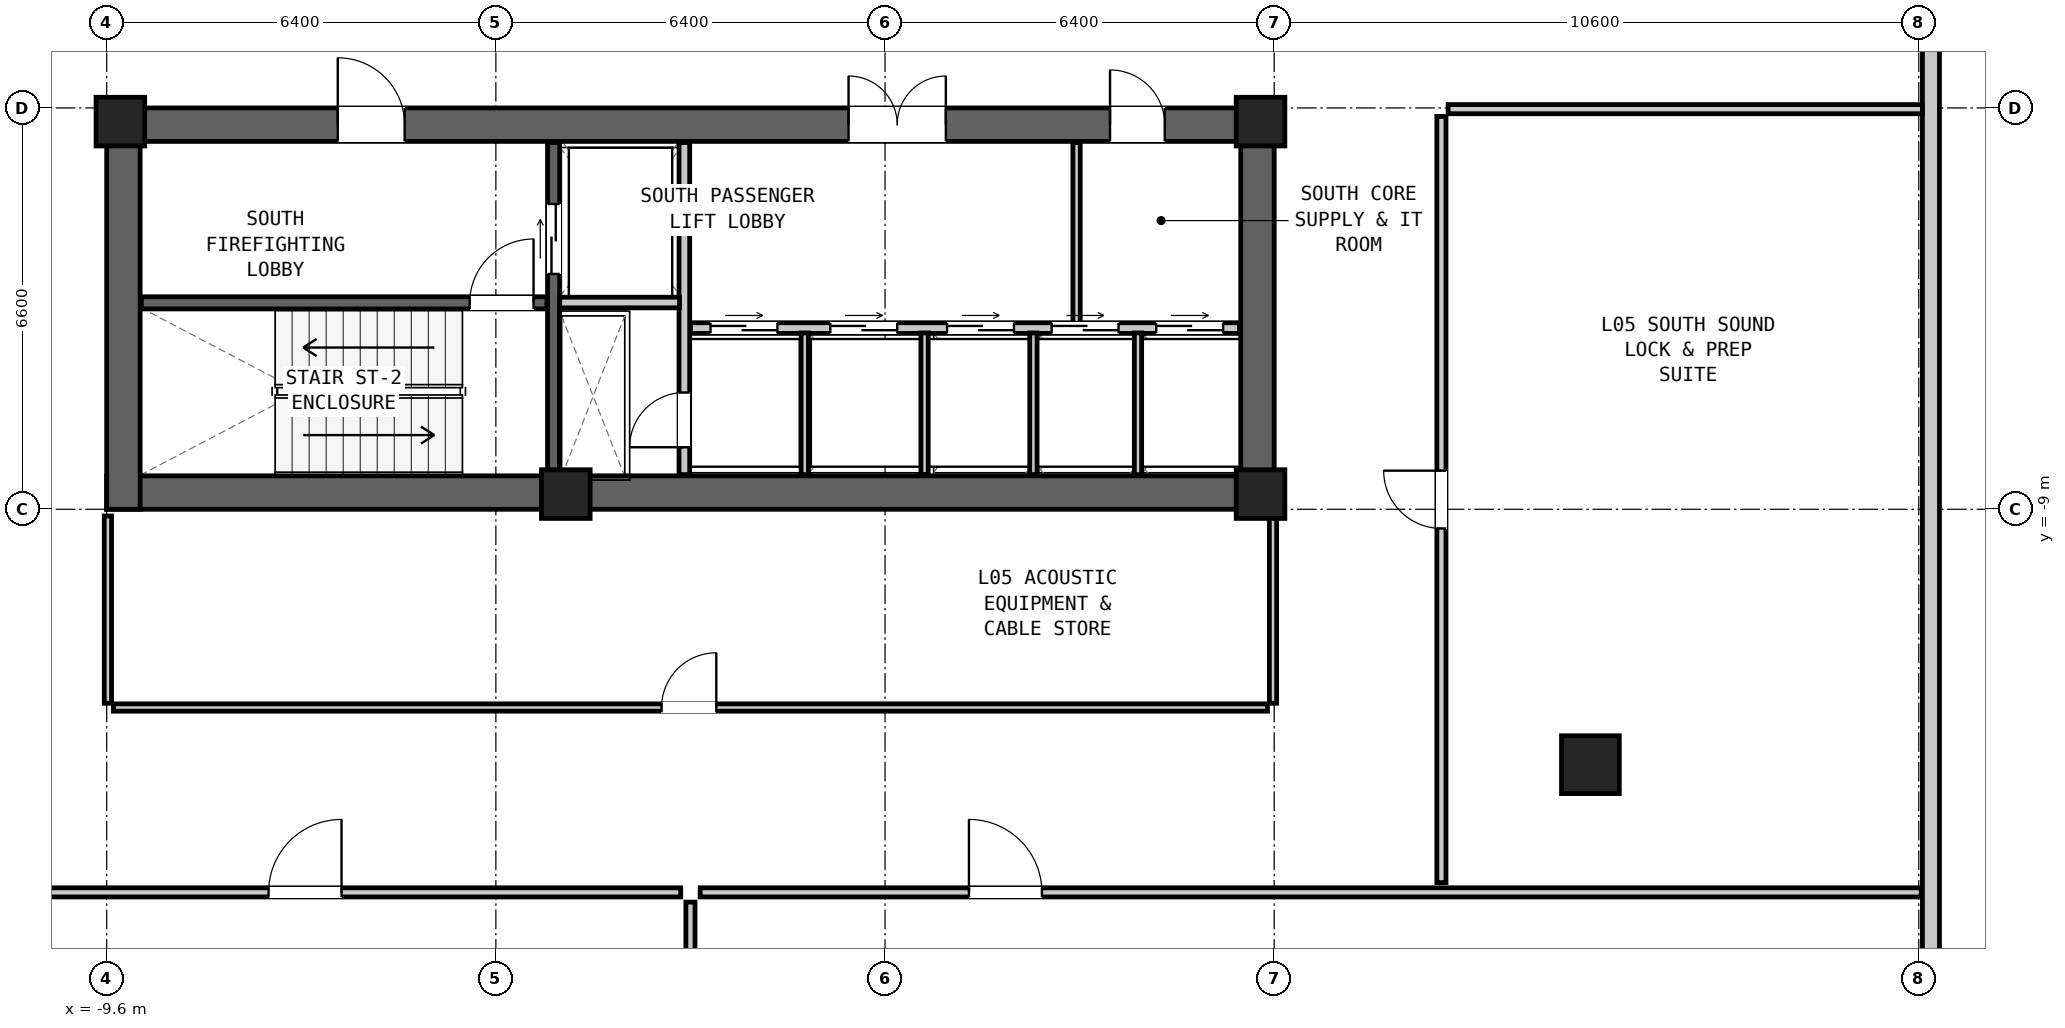
"""IFC4 building model, lengths in metres.
Left out: names, types, materials, properties, quantities, classifications, styles, units other than length and angle.
Written with IfcOpenShell. Run it as: python <this file> out.ifc"""

import sys

from ifc_helpers import new_model, si_unit, direction, frame, frame_2d, origin, origin_2d, place, context, subcontext, project, spatial, rectangle, hollow_rectangle, extrude, element, fill, save


model = new_model("IFC4")
c1 = context("Model", 3, precision=1e-05, world=origin(), true_north=direction((0.0, 1.0)))
c2 = subcontext(c1, "Body", "Model", "MODEL_VIEW")
j1 = project(units=[si_unit("LENGTHUNIT", "METRE"), si_unit("PLANEANGLEUNIT", "RADIAN")], contexts=[c1])
p1 = place(None, origin())
s1 = spatial("IfcSite", under=j1, at=p1, CompositionType="ELEMENT")
p2 = place(p1, origin())
s2 = spatial("IfcBuilding", under=s1, at=p2, CompositionType="ELEMENT")
p3 = place(p2, frame((0.0, 0.0, 21.9)))
s3 = spatial("IfcBuildingStorey", under=s2, at=p3, CompositionType="ELEMENT", Elevation=21.9)
p4 = place(p3, frame((-9.6, -8.725, 0.0), z_axis=(0.0, 0.0, 1.0), x_axis=(1.0, 0.0, 0.0)))
e1 = element("IfcWall", 1, at=p4, inside=s3, PredefinedType="SHEAR", context=c2, shape_type="SweptSolid", body=[
    extrude(rectangle(XDim=19.2, YDim=0.55, at=frame_2d((9.6, 0.0))), origin(), (0.0, 0.0, 1.0), 4.2),
])
p5 = place(p3, frame((-9.6, -2.675, 0.0), z_axis=(0.0, 0.0, 1.0), x_axis=(1.0, 0.0, 0.0)))
e2 = element("IfcWall", 2, at=p5, inside=s3, PredefinedType="SHEAR", context=c2, shape_type="SweptSolid", body=[
    extrude(rectangle(XDim=19.2, YDim=0.55, at=frame_2d((9.6, 0.0))), origin(), (0.0, 0.0, 1.0), 4.2),
])
p6 = place(p5, frame((3.8, 0.0, 0.0)))
e3 = element("IfcOpeningElement", 3, at=p6, cuts=e2, PredefinedType="OPENING", context=c2, shape_type="SweptSolid", body=[
    extrude(rectangle(XDim=1.1, YDim=2.08, at=frame_2d((0.55, 1.04))), frame((0.0, 0.287, 0.0), z_axis=(0.0, -1.0, 0.0), x_axis=(1.0, 0.0, 0.0)), (0.0, 0.0, 1.0), 0.574),
])
p7 = place(p5, frame((12.2, 0.0, 0.0)))
e4 = element("IfcOpeningElement", 4, at=p7, cuts=e2, PredefinedType="OPENING", context=c2, shape_type="SweptSolid", body=[
    extrude(rectangle(XDim=1.6, YDim=2.12, at=frame_2d((0.8, 1.06))), frame((0.0, 0.287, 0.0), z_axis=(0.0, -1.0, 0.0), x_axis=(1.0, 0.0, 0.0)), (0.0, 0.0, 1.0), 0.574),
])
p8 = place(p5, frame((16.5, 0.0, 0.0)))
e5 = element("IfcOpeningElement", 5, at=p8, cuts=e2, PredefinedType="OPENING", context=c2, shape_type="SweptSolid", body=[
    extrude(rectangle(XDim=0.9, YDim=2.05, at=frame_2d((0.45, 1.025))), frame((0.0, 0.287, 0.0), z_axis=(0.0, -1.0, 0.0), x_axis=(1.0, 0.0, 0.0)), (0.0, 0.0, 1.0), 0.574),
])
for number, where, z_axis, x_axis in (
    (6, (-9.325, -9.0, 0.0), (0.0, 0.0, 1.0), (0.0, 1.0, 0.0)),
    (7, (9.325, -9.0, 0.0), (0.0, 0.0, 1.0), (0.0, 1.0, 0.0)),
):
    element("IfcWall", number, at=place(p3, frame(where, z_axis=z_axis, x_axis=x_axis)), inside=s3, PredefinedType="SHEAR", context=c2, shape_type="SweptSolid", body=[
        extrude(rectangle(XDim=6.6, YDim=0.55, at=frame_2d((3.3, 0.0))), origin(), (0.0, 0.0, 1.0), 4.2),
    ])
p9 = place(p3, frame((14.8, -13.2, 0.0), z_axis=(0.0, 0.0, 1.0), x_axis=(1.0, 0.0, 0.0)))
e8 = element("IfcColumn", 8, at=p9, inside=s3, PredefinedType="COLUMN", context=c2, shape_type="SweptSolid", body=[
    extrude(hollow_rectangle(XDim=0.95, YDim=0.95, WallThickness=0.06, at=origin_2d()), origin(), (0.0, 0.0, 1.0), 4.2),
])
for number, where, z_axis, x_axis in (
    (9, (-9.375, -2.625, 0.0), (0.0, 0.0, 1.0), (1.0, 0.0, 0.0)),
    (10, (9.375, -2.625, 0.0), (0.0, 0.0, 1.0), (1.0, 0.0, 0.0)),
    (11, (-2.05, -8.75, 0.0), (0.0, 0.0, 1.0), (1.0, 0.0, 0.0)),
    (12, (9.375, -8.75, 0.0), (0.0, 0.0, 1.0), (1.0, 0.0, 0.0)),
):
    element("IfcColumn", number, at=place(p3, frame(where, z_axis=z_axis, x_axis=x_axis)), inside=s3, PredefinedType="COLUMN", context=c2, shape_type="SweptSolid", body=[
        extrude(rectangle(XDim=0.8, YDim=0.8, at=origin_2d()), origin(), (0.0, 0.0, 1.0), 4.2),
    ])
p10 = place(p3, frame((-9.03, -5.605, 0.0), z_axis=(0.0, 0.0, 1.0), x_axis=(1.0, 0.0, 0.0)))
e13 = element("IfcWall", 13, at=p10, inside=s3, PredefinedType="SHEAR", context=c2, shape_type="SweptSolid", body=[
    extrude(rectangle(XDim=6.67, YDim=0.2, at=frame_2d((3.335, 0.0))), origin(), (0.0, 0.0, 1.0), 3.98),
])
p11 = place(p10, frame((5.4, 0.0, 0.0)))
e14 = element("IfcOpeningElement", 14, at=p11, cuts=e13, PredefinedType="OPENING", context=c2, shape_type="SweptSolid", body=[
    extrude(rectangle(XDim=1.05, YDim=2.08, at=frame_2d((0.525, 1.04))), frame((0.0, 0.112, 0.0), z_axis=(0.0, -1.0, 0.0), x_axis=(1.0, 0.0, 0.0)), (0.0, 0.0, 1.0), 0.224),
])
p12 = place(p3, frame((-2.25, -8.43, 0.0), z_axis=(0.0, 0.0, 1.0), x_axis=(0.0, 1.0, 0.0)))
e15 = element("IfcWall", 15, at=p12, inside=s3, PredefinedType="SHEAR", context=c2, shape_type="SweptSolid", body=[
    extrude(rectangle(XDim=5.46, YDim=0.2, at=frame_2d((2.73, 0.0))), origin(), (0.0, 0.0, 1.0), 3.98),
])
p13 = place(p12, frame((3.3, 0.0, 0.0)))
e16 = element("IfcOpeningElement", 16, at=p13, cuts=e15, PredefinedType="OPENING", context=c2, shape_type="SweptSolid", body=[
    extrude(rectangle(XDim=1.15, YDim=2.08, at=frame_2d((0.575, 1.04))), frame((0.0, 0.112, 0.0), z_axis=(0.0, -1.0, 0.0), x_axis=(1.0, 0.0, 0.0)), (0.0, 0.0, 1.0), 0.224),
])
p14 = place(p3, frame((-0.1, -8.43, 0.0), z_axis=(0.0, 0.0, 1.0), x_axis=(0.0, 1.0, 0.0)))
e17 = element("IfcWall", 17, at=p14, inside=s3, PredefinedType="PARTITIONING", context=c2, shape_type="SweptSolid", body=[
    extrude(rectangle(XDim=5.46, YDim=0.175, at=frame_2d((2.73, 0.0))), origin(), (0.0, 0.0, 1.0), 3.98),
])
p15 = place(p14, frame((0.45, 0.0, 0.0)))
e18 = element("IfcOpeningElement", 18, at=p15, cuts=e17, PredefinedType="OPENING", context=c2, shape_type="SweptSolid", body=[
    extrude(rectangle(XDim=0.9, YDim=2.05, at=frame_2d((0.45, 1.025))), frame((0.0, 0.1, 0.0), z_axis=(0.0, -1.0, 0.0), x_axis=(1.0, 0.0, 0.0)), (0.0, 0.0, 1.0), 0.199),
])
p16 = place(p3, frame((-2.15, -5.6, 0.0), z_axis=(0.0, 0.0, 1.0), x_axis=(1.0, 0.0, 0.0)))
e19 = element("IfcWall", 19, at=p16, inside=s3, PredefinedType="PARTITIONING", context=c2, shape_type="SweptSolid", body=[
    extrude(rectangle(XDim=1.97, YDim=0.175, at=frame_2d((0.985, 0.0))), origin(), (0.0, 0.0, 1.0), 3.98),
])
p17 = place(p3, frame((0.0, -6.02, 0.0), z_axis=(0.0, 0.0, 1.0), x_axis=(1.0, 0.0, 0.0)))
e20 = element("IfcWall", 20, at=p17, inside=s3, PredefinedType="PARTITIONING", context=c2, shape_type="SweptSolid", body=[
    extrude(rectangle(XDim=9.03, YDim=0.175, at=frame_2d((4.515, 0.0))), origin(), (0.0, 0.0, 1.0), 3.98),
])
p18 = place(p17, frame((0.33, 0.0, 0.0)))
e21 = element("IfcOpeningElement", 21, at=p18, cuts=e20, PredefinedType="OPENING", context=c2, shape_type="SweptSolid", body=[
    extrude(rectangle(XDim=1.1, YDim=2.06, at=frame_2d((0.55, 1.03))), frame((0.0, 0.1, 0.0), z_axis=(0.0, -1.0, 0.0), x_axis=(1.0, 0.0, 0.0)), (0.0, 0.0, 1.0), 0.199),
])
p19 = place(p17, frame((2.3, 0.0, 0.0)))
e22 = element("IfcOpeningElement", 22, at=p19, cuts=e20, PredefinedType="OPENING", context=c2, shape_type="SweptSolid", body=[
    extrude(rectangle(XDim=1.1, YDim=2.06, at=frame_2d((0.55, 1.03))), frame((0.0, 0.1, 0.0), z_axis=(0.0, -1.0, 0.0), x_axis=(1.0, 0.0, 0.0)), (0.0, 0.0, 1.0), 0.199),
])
p20 = place(p17, frame((4.22, 0.0, 0.0)))
e23 = element("IfcOpeningElement", 23, at=p20, cuts=e20, PredefinedType="OPENING", context=c2, shape_type="SweptSolid", body=[
    extrude(rectangle(XDim=1.1, YDim=2.06, at=frame_2d((0.55, 1.03))), frame((0.0, 0.1, 0.0), z_axis=(0.0, -1.0, 0.0), x_axis=(1.0, 0.0, 0.0)), (0.0, 0.0, 1.0), 0.199),
])
p21 = place(p17, frame((5.94, 0.0, 0.0)))
e24 = element("IfcOpeningElement", 24, at=p21, cuts=e20, PredefinedType="OPENING", context=c2, shape_type="SweptSolid", body=[
    extrude(rectangle(XDim=1.1, YDim=2.06, at=frame_2d((0.55, 1.03))), frame((0.0, 0.1, 0.0), z_axis=(0.0, -1.0, 0.0), x_axis=(1.0, 0.0, 0.0)), (0.0, 0.0, 1.0), 0.199),
])
p22 = place(p17, frame((7.66, 0.0, 0.0)))
e25 = element("IfcOpeningElement", 25, at=p22, cuts=e20, PredefinedType="OPENING", context=c2, shape_type="SweptSolid", body=[
    extrude(rectangle(XDim=1.1, YDim=2.06, at=frame_2d((0.55, 1.03))), frame((0.0, 0.1, 0.0), z_axis=(0.0, -1.0, 0.0), x_axis=(1.0, 0.0, 0.0)), (0.0, 0.0, 1.0), 0.199),
])
for number, where, z_axis, x_axis in (
    (26, (1.88, -8.43, 0.0), (0.0, 0.0, 1.0), (0.0, 1.0, 0.0)),
    (27, (3.85, -8.43, 0.0), (0.0, 0.0, 1.0), (0.0, 1.0, 0.0)),
    (28, (5.64, -8.43, 0.0), (0.0, 0.0, 1.0), (0.0, 1.0, 0.0)),
    (29, (7.36, -8.43, 0.0), (0.0, 0.0, 1.0), (0.0, 1.0, 0.0)),
):
    element("IfcWall", number, at=place(p3, frame(where, z_axis=z_axis, x_axis=x_axis)), inside=s3, PredefinedType="PARTITIONING", context=c2, shape_type="SweptSolid", body=[
        extrude(rectangle(XDim=2.33, YDim=0.12, at=frame_2d((1.165, 0.0))), origin(), (0.0, 0.0, 1.0), 3.98),
    ])
p23 = place(p3, frame((6.35, -5.94, 0.0), z_axis=(0.0, 0.0, 1.0), x_axis=(0.0, 1.0, 0.0)))
e30 = element("IfcWall", 30, at=p23, inside=s3, PredefinedType="PARTITIONING", context=c2, shape_type="SweptSolid", body=[
    extrude(rectangle(XDim=2.97, YDim=0.12, at=frame_2d((1.485, 0.0))), origin(), (0.0, 0.0, 1.0), 3.98),
])
p24 = place(p3, frame((20.4, -25.74, 0.0), z_axis=(0.0, 0.0, 1.0), x_axis=(0.0, 1.0, 0.0)))
e31 = element("IfcWall", 31, at=p24, inside=s3, PredefinedType="MOVABLE", context=c2, shape_type="SweptSolid", body=[
    extrude(rectangle(XDim=51.48, YDim=0.28, at=frame_2d((25.74, 0.0))), origin(), (0.0, 0.0, 1.0), 3.98),
])
p25 = place(p24, frame((25.255, 0.0, 0.0)))
e32 = element("IfcOpeningElement", 32, at=p25, cuts=e31, PredefinedType="OPENING", context=c2, shape_type="SweptSolid", body=[
    extrude(rectangle(XDim=2.0, YDim=2.14, at=frame_2d((1.0, 1.07))), frame((0.0, 0.152, 0.0), z_axis=(0.0, -1.0, 0.0), x_axis=(1.0, 0.0, 0.0)), (0.0, 0.0, 1.0), 0.304),
])
p26 = place(p3, frame((-28.24, -15.3, 0.0), z_axis=(0.0, 0.0, 1.0), x_axis=(1.0, 0.0, 0.0)))
e33 = element("IfcWall", 33, at=p26, inside=s3, PredefinedType="PARTITIONING", context=c2, shape_type="SweptSolid", body=[
    extrude(rectangle(XDim=28.08, YDim=0.15, at=frame_2d((14.04, 0.0))), origin(), (0.0, 0.0, 1.0), 3.98),
])
p27 = place(p26, frame((21.302, 0.0, 0.0)))
e34 = element("IfcOpeningElement", 34, at=p27, cuts=e33, PredefinedType="OPENING", context=c2, shape_type="SweptSolid", body=[
    extrude(rectangle(XDim=1.2, YDim=2.1, at=frame_2d((0.6, 1.05))), frame((0.0, 0.087, 0.0), z_axis=(0.0, -1.0, 0.0), x_axis=(1.0, 0.0, 0.0)), (0.0, 0.0, 1.0), 0.174),
])
p28 = place(p3, frame((0.16, -15.3, 0.0), z_axis=(0.0, 0.0, 1.0), x_axis=(1.0, 0.0, 0.0)))
e35 = element("IfcWall", 35, at=p28, inside=s3, PredefinedType="PARTITIONING", context=c2, shape_type="SweptSolid", body=[
    extrude(rectangle(XDim=20.08, YDim=0.15, at=frame_2d((10.04, 0.0))), origin(), (0.0, 0.0, 1.0), 3.98),
])
p29 = place(p28, frame((4.42, 0.0, 0.0)))
e36 = element("IfcOpeningElement", 36, at=p29, cuts=e35, PredefinedType="OPENING", context=c2, shape_type="SweptSolid", body=[
    extrude(rectangle(XDim=1.2, YDim=2.1, at=frame_2d((0.6, 1.05))), frame((0.0, 0.087, 0.0), z_axis=(0.0, -1.0, 0.0), x_axis=(1.0, 0.0, 0.0)), (0.0, 0.0, 1.0), 0.174),
])
p30 = place(p3, frame((0.0, -25.74, 0.0), z_axis=(0.0, 0.0, 1.0), x_axis=(0.0, 1.0, 0.0)))
e37 = element("IfcWall", 37, at=p30, inside=s3, PredefinedType="PARTITIONING", context=c2, shape_type="SweptSolid", body=[
    extrude(rectangle(XDim=10.28, YDim=0.15, at=frame_2d((5.14, 0.0))), origin(), (0.0, 0.0, 1.0), 3.424),
])
p31 = place(p3, frame((12.35, -15.14, 0.0), z_axis=(0.0, 0.0, 1.0), x_axis=(0.0, 1.0, 0.0)))
e38 = element("IfcWall", 38, at=p31, inside=s3, PredefinedType="PARTITIONING", context=c2, shape_type="SweptSolid", body=[
    extrude(rectangle(XDim=12.6, YDim=0.15, at=frame_2d((6.3, 0.0))), origin(), (0.0, 0.0, 1.0), 3.98),
])
p32 = place(p31, frame((5.825, 0.0, 0.0)))
e39 = element("IfcOpeningElement", 39, at=p32, cuts=e38, PredefinedType="OPENING", context=c2, shape_type="SweptSolid", body=[
    extrude(rectangle(XDim=0.95, YDim=2.1, at=frame_2d((0.475, 1.05))), frame((0.0, 0.087, 0.0), z_axis=(0.0, -1.0, 0.0), x_axis=(1.0, 0.0, 0.0)), (0.0, 0.0, 1.0), 0.174),
])
p33 = place(p3, frame((12.46, -2.42, 0.0), z_axis=(0.0, 0.0, 1.0), x_axis=(1.0, 0.0, 0.0)))
e40 = element("IfcWall", 40, at=p33, inside=s3, PredefinedType="PARTITIONING", context=c2, shape_type="SweptSolid", body=[
    extrude(rectangle(XDim=7.8, YDim=0.15, at=frame_2d((3.9, 0.0))), origin(), (0.0, 0.0, 1.0), 2.949),
])
p34 = place(p3, frame((-9.49, -12.26, 0.0), z_axis=(0.0, 0.0, 1.0), x_axis=(1.0, 0.0, 0.0)))
e41 = element("IfcWall", 41, at=p34, inside=s3, PredefinedType="PARTITIONING", context=c2, shape_type="SweptSolid", body=[
    extrude(rectangle(XDim=18.98, YDim=0.12, at=frame_2d((9.49, 0.0))), origin(), (0.0, 0.0, 1.0), 3.424),
])
p35 = place(p34, frame((9.015, 0.0, 0.0)))
e42 = element("IfcOpeningElement", 42, at=p35, cuts=e41, PredefinedType="OPENING", context=c2, shape_type="SweptSolid", body=[
    extrude(rectangle(XDim=0.9, YDim=2.05, at=frame_2d((0.45, 1.025))), frame((0.0, 0.072, 0.0), z_axis=(0.0, -1.0, 0.0), x_axis=(1.0, 0.0, 0.0)), (0.0, 0.0, 1.0), 0.144),
])
for number, where, z_axis, x_axis in (
    (43, (-9.58, -12.19, 0.0), (0.0, 0.0, 1.0), (0.0, 1.0, 0.0)),
    (44, (9.58, -12.19, 0.0), (0.0, 0.0, 1.0), (0.0, 1.0, 0.0)),
):
    element("IfcWall", number, at=place(p3, frame(where, z_axis=z_axis, x_axis=x_axis)), inside=s3, PredefinedType="PARTITIONING", context=c2, shape_type="SweptSolid", body=[
        extrude(rectangle(XDim=3.08, YDim=0.12, at=frame_2d((1.54, 0.0))), origin(), (0.0, 0.0, 1.0), 2.949),
    ])
p36 = place(p11, origin())
e45 = element("IfcDoor", 45, at=p36, inside=s3, OperationType="SINGLE_SWING_RIGHT", PredefinedType="DOOR", context=c2, shape_type="SweptSolid", body=[
    extrude(rectangle(XDim=1.05, YDim=2.08, at=frame_2d((0.525, 1.04))), frame((0.0, 0.025, 0.0), z_axis=(0.0, -1.0, 0.0), x_axis=(1.0, 0.0, 0.0)), (0.0, 0.0, 1.0), 0.05),
])
fill(e14, e45)
p37 = place(p6, origin())
e46 = element("IfcDoor", 46, at=p37, inside=s3, OperationType="SINGLE_SWING_LEFT", PredefinedType="DOOR", context=c2, shape_type="SweptSolid", body=[
    extrude(rectangle(XDim=1.1, YDim=2.08, at=frame_2d((0.55, 1.04))), frame((0.0, 0.025, 0.0), z_axis=(0.0, -1.0, 0.0), x_axis=(1.0, 0.0, 0.0)), (0.0, 0.0, 1.0), 0.05),
])
fill(e3, e46)
p38 = place(p13, origin())
e47 = element("IfcDoor", 47, at=p38, inside=s3, OperationType="DOUBLE_DOOR_SLIDING", PredefinedType="DOOR", context=c2, shape_type="SweptSolid", body=[
    extrude(rectangle(XDim=1.15, YDim=2.08, at=frame_2d((0.575, 1.04))), frame((0.0, 0.025, 0.0), z_axis=(0.0, -1.0, 0.0), x_axis=(1.0, 0.0, 0.0)), (0.0, 0.0, 1.0), 0.05),
])
fill(e16, e47)
p39 = place(p15, origin())
e48 = element("IfcDoor", 48, at=p39, inside=s3, OperationType="SINGLE_SWING_LEFT", PredefinedType="DOOR", context=c2, shape_type="SweptSolid", body=[
    extrude(rectangle(XDim=0.9, YDim=2.05, at=frame_2d((0.45, 1.025))), frame((0.0, 0.025, 0.0), z_axis=(0.0, -1.0, 0.0), x_axis=(1.0, 0.0, 0.0)), (0.0, 0.0, 1.0), 0.05),
])
fill(e18, e48)
p40 = place(p7, origin())
e49 = element("IfcDoor", 49, at=p40, inside=s3, OperationType="DOUBLE_DOOR_SINGLE_SWING", PredefinedType="DOOR", context=c2, shape_type="SweptSolid", body=[
    extrude(rectangle(XDim=1.6, YDim=2.12, at=frame_2d((0.8, 1.06))), frame((0.0, 0.025, 0.0), z_axis=(0.0, -1.0, 0.0), x_axis=(1.0, 0.0, 0.0)), (0.0, 0.0, 1.0), 0.05),
])
fill(e4, e49)
p41 = place(p8, origin())
e50 = element("IfcDoor", 50, at=p41, inside=s3, OperationType="SINGLE_SWING_LEFT", PredefinedType="DOOR", context=c2, shape_type="SweptSolid", body=[
    extrude(rectangle(XDim=0.9, YDim=2.05, at=frame_2d((0.45, 1.025))), frame((0.0, 0.025, 0.0), z_axis=(0.0, -1.0, 0.0), x_axis=(1.0, 0.0, 0.0)), (0.0, 0.0, 1.0), 0.05),
])
fill(e5, e50)
p42 = place(p27, origin())
e51 = element("IfcDoor", 51, at=p42, inside=s3, OperationType="SINGLE_SWING_RIGHT", PredefinedType="DOOR", context=c2, shape_type="SweptSolid", body=[
    extrude(rectangle(XDim=1.2, YDim=2.1, at=frame_2d((0.6, 1.05))), frame((0.0, 0.025, 0.0), z_axis=(0.0, -1.0, 0.0), x_axis=(1.0, 0.0, 0.0)), (0.0, 0.0, 1.0), 0.05),
])
fill(e34, e51)
p43 = place(p29, origin())
e52 = element("IfcDoor", 52, at=p43, inside=s3, OperationType="SINGLE_SWING_LEFT", PredefinedType="DOOR", context=c2, shape_type="SweptSolid", body=[
    extrude(rectangle(XDim=1.2, YDim=2.1, at=frame_2d((0.6, 1.05))), frame((0.0, 0.025, 0.0), z_axis=(0.0, -1.0, 0.0), x_axis=(1.0, 0.0, 0.0)), (0.0, 0.0, 1.0), 0.05),
])
fill(e36, e52)
p44 = place(p32, origin())
e53 = element("IfcDoor", 53, at=p44, inside=s3, OperationType="SINGLE_SWING_RIGHT", PredefinedType="DOOR", context=c2, shape_type="SweptSolid", body=[
    extrude(rectangle(XDim=0.95, YDim=2.1, at=frame_2d((0.475, 1.05))), frame((0.0, 0.025, 0.0), z_axis=(0.0, -1.0, 0.0), x_axis=(1.0, 0.0, 0.0)), (0.0, 0.0, 1.0), 0.05),
])
fill(e39, e53)
p45 = place(p35, origin())
e54 = element("IfcDoor", 54, at=p45, inside=s3, OperationType="SINGLE_SWING_RIGHT", PredefinedType="DOOR", context=c2, shape_type="SweptSolid", body=[
    extrude(rectangle(XDim=0.9, YDim=2.05, at=frame_2d((0.45, 1.025))), frame((0.0, 0.025, 0.0), z_axis=(0.0, -1.0, 0.0), x_axis=(1.0, 0.0, 0.0)), (0.0, 0.0, 1.0), 0.05),
])
fill(e42, e54)
p46 = place(p18, origin())
e55 = element("IfcDoor", 55, at=p46, inside=s3, OperationType="DOUBLE_DOOR_SLIDING", PredefinedType="DOOR", context=c2, shape_type="SweptSolid", body=[
    extrude(rectangle(XDim=1.1, YDim=2.06, at=frame_2d((0.55, 1.03))), frame((0.0, 0.025, 0.0), z_axis=(0.0, -1.0, 0.0), x_axis=(1.0, 0.0, 0.0)), (0.0, 0.0, 1.0), 0.05),
])
fill(e21, e55)
p47 = place(p19, origin())
e56 = element("IfcDoor", 56, at=p47, inside=s3, OperationType="DOUBLE_DOOR_SLIDING", PredefinedType="DOOR", context=c2, shape_type="SweptSolid", body=[
    extrude(rectangle(XDim=1.1, YDim=2.06, at=frame_2d((0.55, 1.03))), frame((0.0, 0.025, 0.0), z_axis=(0.0, -1.0, 0.0), x_axis=(1.0, 0.0, 0.0)), (0.0, 0.0, 1.0), 0.05),
])
fill(e22, e56)
p48 = place(p20, origin())
e57 = element("IfcDoor", 57, at=p48, inside=s3, OperationType="DOUBLE_DOOR_SLIDING", PredefinedType="DOOR", context=c2, shape_type="SweptSolid", body=[
    extrude(rectangle(XDim=1.1, YDim=2.06, at=frame_2d((0.55, 1.03))), frame((0.0, 0.025, 0.0), z_axis=(0.0, -1.0, 0.0), x_axis=(1.0, 0.0, 0.0)), (0.0, 0.0, 1.0), 0.05),
])
fill(e23, e57)
p49 = place(p21, origin())
e58 = element("IfcDoor", 58, at=p49, inside=s3, OperationType="DOUBLE_DOOR_SLIDING", PredefinedType="DOOR", context=c2, shape_type="SweptSolid", body=[
    extrude(rectangle(XDim=1.1, YDim=2.06, at=frame_2d((0.55, 1.03))), frame((0.0, 0.025, 0.0), z_axis=(0.0, -1.0, 0.0), x_axis=(1.0, 0.0, 0.0)), (0.0, 0.0, 1.0), 0.05),
])
fill(e24, e58)
p50 = place(p22, origin())
e59 = element("IfcDoor", 59, at=p50, inside=s3, OperationType="DOUBLE_DOOR_SLIDING", PredefinedType="DOOR", context=c2, shape_type="SweptSolid", body=[
    extrude(rectangle(XDim=1.1, YDim=2.06, at=frame_2d((0.55, 1.03))), frame((0.0, 0.025, 0.0), z_axis=(0.0, -1.0, 0.0), x_axis=(1.0, 0.0, 0.0)), (0.0, 0.0, 1.0), 0.05),
])
fill(e25, e59)
save(model, sys.argv[1])
